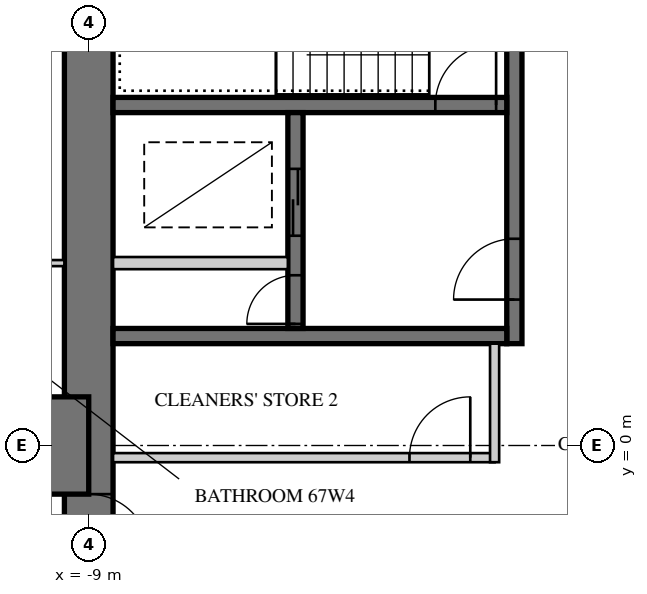
"""IFC4 building model, lengths in metres.
Left out: names, types, materials, properties, quantities, classifications, styles, units other than length and angle.
Written with IfcOpenShell. Run it as: python <this file> out.ifc"""

import sys

from ifc_helpers import new_model, si_unit, direction, frame, frame_2d, origin, place, context, subcontext, project, spatial, rectangle, extrude, element, fill, save


model = new_model("IFC4")
c1 = context("Model", 3, precision=1e-05, world=origin(), true_north=direction((0.0, 1.0)))
c2 = subcontext(c1, "Body", "Model", "MODEL_VIEW")
j1 = project(units=[si_unit("LENGTHUNIT", "METRE"), si_unit("PLANEANGLEUNIT", "RADIAN")], contexts=[c1])
p1 = place(None, origin())
s1 = spatial("IfcSite", under=j1, at=p1, CompositionType="ELEMENT")
p2 = place(p1, origin())
s2 = spatial("IfcBuilding", under=s1, at=p2, CompositionType="ELEMENT")
p3 = place(p2, frame((0.0, 0.0, 261.1)))
s3 = spatial("IfcBuildingStorey", under=s2, at=p3, CompositionType="ELEMENT", Elevation=261.1)
p4 = place(p3, frame((-9.0, 9.0, 0.0), z_axis=(0.0, 0.0, 1.0), x_axis=(0.0, -1.0, 0.0)))
e1 = element("IfcWall", 1, at=p4, inside=s3, PredefinedType="SHEAR", context=c2, shape_type="SweptSolid", body=[
    extrude(rectangle(XDim=18.0, YDim=0.8, at=frame_2d((9.0, 0.0))), origin(), (0.0, 0.0, 1.0), 3.4),
])
p5 = place(p4, frame((9.8, 0.0, 0.0)))
e2 = element("IfcOpeningElement", 2, at=p5, cuts=e1, PredefinedType="OPENING", context=c2, shape_type="SweptSolid", body=[
    extrude(rectangle(XDim=1.0, YDim=2.4, at=frame_2d((0.5, 1.2))), frame((0.0, 0.41, 0.0), z_axis=(0.0, -1.0, 0.0), x_axis=(1.0, 0.0, 0.0)), (0.0, 0.0, 1.0), 0.82),
])
p6 = place(p3, frame((-2.0, 1.675, 0.0), z_axis=(0.0, 0.0, 1.0), x_axis=(0.0, 1.0, 0.0)))
e3 = element("IfcWall", 3, at=p6, inside=s3, PredefinedType="SHEAR", context=c2, shape_type="SweptSolid", body=[
    extrude(rectangle(XDim=6.925, YDim=0.25, at=frame_2d((3.462, 0.0))), origin(), (0.0, 0.0, 1.0), 3.4),
])
p7 = place(p6, frame((0.725, 0.0, 0.0)))
e4 = element("IfcOpeningElement", 4, at=p7, cuts=e3, PredefinedType="OPENING", context=c2, shape_type="SweptSolid", body=[
    extrude(rectangle(XDim=1.0, YDim=2.1, at=frame_2d((0.5, 1.05))), frame((0.0, 0.135, 0.0), z_axis=(0.0, -1.0, 0.0), x_axis=(1.0, 0.0, 0.0)), (0.0, 0.0, 1.0), 0.27),
])
p8 = place(p3, frame((-2.125, 1.8, 0.0), z_axis=(0.0, 0.0, 1.0), x_axis=(-1.0, 0.0, 0.0)))
e5 = element("IfcWall", 5, at=p8, inside=s3, PredefinedType="SHEAR", context=c2, shape_type="SweptSolid", body=[
    extrude(rectangle(XDim=6.475, YDim=0.25, at=frame_2d((3.238, 0.0))), origin(), (0.0, 0.0, 1.0), 3.4),
])
p9 = place(p3, frame((-2.125, 5.6, 0.0), z_axis=(0.0, 0.0, 1.0), x_axis=(-1.0, 0.0, 0.0)))
e6 = element("IfcWall", 6, at=p9, inside=s3, PredefinedType="SHEAR", context=c2, shape_type="SweptSolid", body=[
    extrude(rectangle(XDim=6.475, YDim=0.25, at=frame_2d((3.238, 0.0))), origin(), (0.0, 0.0, 1.0), 3.4),
])
p10 = place(p9, frame((0.175, 0.0, 0.0)))
e7 = element("IfcOpeningElement", 7, at=p10, cuts=e6, PredefinedType="OPENING", context=c2, shape_type="SweptSolid", body=[
    extrude(rectangle(XDim=1.0, YDim=2.1, at=frame_2d((0.5, 1.05))), frame((0.0, 0.135, 0.0), z_axis=(0.0, -1.0, 0.0), x_axis=(1.0, 0.0, 0.0)), (0.0, 0.0, 1.0), 0.27),
])
p11 = place(p3, frame((-5.6, 1.925, 0.0), z_axis=(0.0, 0.0, 1.0), x_axis=(0.0, 1.0, 0.0)))
e8 = element("IfcWall", 8, at=p11, inside=s3, PredefinedType="SHEAR", context=c2, shape_type="SweptSolid", body=[
    extrude(rectangle(XDim=3.55, YDim=0.25, at=frame_2d((1.775, 0.0))), origin(), (0.0, 0.0, 1.0), 3.4),
])
p12 = place(p11, frame((1.525, 0.0, 0.0)))
e9 = element("IfcOpeningElement", 9, at=p12, cuts=e8, PredefinedType="OPENING", context=c2, shape_type="SweptSolid", body=[
    extrude(rectangle(XDim=1.1, YDim=2.2, at=frame_2d((0.55, 1.1))), frame((0.0, 0.135, 0.0), z_axis=(0.0, -1.0, 0.0), x_axis=(1.0, 0.0, 0.0)), (0.0, 0.0, 1.0), 0.27),
])
p13 = place(p11, frame((0.075, 0.0, 0.0)))
e10 = element("IfcOpeningElement", 10, at=p13, cuts=e8, PredefinedType="OPENING", context=c2, shape_type="SweptSolid", body=[
    extrude(rectangle(XDim=0.8, YDim=2.1, at=frame_2d((0.4, 1.05))), frame((0.0, 0.135, 0.0), z_axis=(0.0, -1.0, 0.0), x_axis=(1.0, 0.0, 0.0)), (0.0, 0.0, 1.0), 0.27),
])
p14 = place(p3, frame((-5.725, 3.0, 0.0), z_axis=(0.0, 0.0, 1.0), x_axis=(-1.0, 0.0, 0.0)))
e11 = element("IfcWall", 11, at=p14, inside=s3, PredefinedType="PARTITIONING", context=c2, shape_type="SweptSolid", body=[
    extrude(rectangle(XDim=2.875, YDim=0.2, at=frame_2d((1.438, 0.0))), origin(), (0.0, 0.0, 1.0), 3.4),
])
p15 = place(p3, frame((-9.0, 0.0, 0.0), z_axis=(0.0, 0.0, 1.0), x_axis=(-1.0, 0.0, 0.0)))
e12 = element("IfcWall", 12, at=p15, inside=s3, PredefinedType="SHEAR", context=c2, shape_type="SweptSolid", body=[
    extrude(rectangle(XDim=9.0, YDim=1.6, at=frame_2d((4.5, 0.0))), origin(), (0.0, 0.0, 1.0), 3.4),
])
p16 = place(p15, frame((3.8, 0.0, 0.0)))
e13 = element("IfcOpeningElement", 13, at=p16, cuts=e12, PredefinedType="OPENING", context=c2, shape_type="SweptSolid", body=[
    extrude(rectangle(XDim=1.0, YDim=2.15, at=frame_2d((0.5, 1.075))), frame((0.0, 0.81, 0.0), z_axis=(0.0, -1.0, 0.0), x_axis=(1.0, 0.0, 0.0)), (0.0, 0.0, 1.0), 1.62),
])
p17 = place(p15, frame((7.0, 0.0, 0.0)))
e14 = element("IfcOpeningElement", 14, at=p17, cuts=e12, PredefinedType="OPENING", context=c2, shape_type="SweptSolid", body=[
    extrude(rectangle(XDim=1.0, YDim=2.2, at=frame_2d((0.5, 1.1))), frame((0.0, 0.81, 0.0), z_axis=(0.0, -1.0, 0.0), x_axis=(1.0, 0.0, 0.0)), (0.0, 0.0, 1.0), 1.62),
])
p18 = place(p3, frame((-2.325, -0.2, 0.0), z_axis=(0.0, 0.0, 1.0), x_axis=(-1.0, 0.0, 0.0)))
e15 = element("IfcWall", 15, at=p18, inside=s3, PredefinedType="PARTITIONING", context=c2, shape_type="SweptSolid", body=[
    extrude(rectangle(XDim=6.275, YDim=0.15, at=frame_2d((3.138, 0.0))), origin(), (0.0, 0.0, 1.0), 3.22),
])
p19 = place(p18, frame((0.4, 0.0, 0.0)))
e16 = element("IfcOpeningElement", 16, at=p19, cuts=e15, PredefinedType="OPENING", context=c2, shape_type="SweptSolid", body=[
    extrude(rectangle(XDim=1.0, YDim=2.1, at=frame_2d((0.5, 1.05))), frame((0.0, 0.085, 0.0), z_axis=(0.0, -1.0, 0.0), x_axis=(1.0, 0.0, 0.0)), (0.0, 0.0, 1.0), 0.17),
])
p20 = place(p3, frame((-2.325, 1.675, 0.0), z_axis=(0.0, 0.0, 1.0), x_axis=(0.0, -1.0, 0.0)))
e17 = element("IfcWall", 17, at=p20, inside=s3, PredefinedType="PARTITIONING", context=c2, shape_type="SweptSolid", body=[
    extrude(rectangle(XDim=1.95, YDim=0.15, at=frame_2d((0.975, 0.0))), origin(), (0.0, 0.0, 1.0), 3.22),
])
p21 = place(p3, frame((-9.4, 3.0, 0.0), z_axis=(0.0, 0.0, 1.0), x_axis=(-1.0, 0.0, 0.0)))
e18 = element("IfcWall", 18, at=p21, inside=s3, PredefinedType="PARTITIONING", context=c2, shape_type="SweptSolid", body=[
    extrude(rectangle(XDim=2.65, YDim=0.1, at=frame_2d((1.325, 0.0))), origin(), (0.0, 0.0, 1.0), 3.22),
])
p22 = place(p19, frame((1.0, 0.0, 0.0), z_axis=(0.0, 0.0, 1.0), x_axis=(-1.0, 0.0, 0.0)))
e19 = element("IfcDoor", 19, at=p22, inside=s3, OperationType="SINGLE_SWING_RIGHT", PredefinedType="DOOR", context=c2, shape_type="SweptSolid", body=[
    extrude(rectangle(XDim=1.0, YDim=2.1, at=frame_2d((0.5, 1.05))), frame((0.0, 0.025, 0.0), z_axis=(0.0, -1.0, 0.0), x_axis=(1.0, 0.0, 0.0)), (0.0, 0.0, 1.0), 0.05),
])
fill(e16, e19)
p23 = place(p5, origin())
e20 = element("IfcDoor", 20, at=p23, inside=s3, OperationType="SINGLE_SWING_RIGHT", PredefinedType="DOOR", context=c2, shape_type="SweptSolid", body=[
    extrude(rectangle(XDim=1.0, YDim=2.4, at=frame_2d((0.5, 1.2))), frame((0.0, 0.055, 0.0), z_axis=(0.0, -1.0, 0.0), x_axis=(1.0, 0.0, 0.0)), (0.0, 0.0, 1.0), 0.05),
])
fill(e2, e20)
p24 = place(p7, origin())
e21 = element("IfcDoor", 21, at=p24, inside=s3, OperationType="SINGLE_SWING_LEFT", PredefinedType="DOOR", context=c2, shape_type="SweptSolid", body=[
    extrude(rectangle(XDim=1.0, YDim=2.1, at=frame_2d((0.5, 1.05))), frame((0.0, 0.025, 0.0), z_axis=(0.0, -1.0, 0.0), x_axis=(1.0, 0.0, 0.0)), (0.0, 0.0, 1.0), 0.05),
])
fill(e4, e21)
p25 = place(p10, frame((1.0, 0.0, 0.0), z_axis=(0.0, 0.0, 1.0), x_axis=(-1.0, 0.0, 0.0)))
e22 = element("IfcDoor", 22, at=p25, inside=s3, OperationType="SINGLE_SWING_RIGHT", PredefinedType="DOOR", context=c2, shape_type="SweptSolid", body=[
    extrude(rectangle(XDim=1.0, YDim=2.1, at=frame_2d((0.5, 1.05))), frame((0.0, 0.025, 0.0), z_axis=(0.0, -1.0, 0.0), x_axis=(1.0, 0.0, 0.0)), (0.0, 0.0, 1.0), 0.05),
])
fill(e7, e22)
p26 = place(p12, origin())
e23 = element("IfcDoor", 23, at=p26, inside=s3, OperationType="DOUBLE_DOOR_SLIDING", PredefinedType="DOOR", context=c2, shape_type="SweptSolid", body=[
    extrude(rectangle(XDim=1.1, YDim=2.2, at=frame_2d((0.55, 1.1))), frame((0.0, 0.025, 0.0), z_axis=(0.0, -1.0, 0.0), x_axis=(1.0, 0.0, 0.0)), (0.0, 0.0, 1.0), 0.05),
])
fill(e9, e23)
p27 = place(p13, origin())
e24 = element("IfcDoor", 24, at=p27, inside=s3, OperationType="SINGLE_SWING_LEFT", PredefinedType="DOOR", context=c2, shape_type="SweptSolid", body=[
    extrude(rectangle(XDim=0.8, YDim=2.1, at=frame_2d((0.4, 1.05))), frame((0.0, 0.025, 0.0), z_axis=(0.0, -1.0, 0.0), x_axis=(1.0, 0.0, 0.0)), (0.0, 0.0, 1.0), 0.05),
])
fill(e10, e24)
save(model, sys.argv[1])
